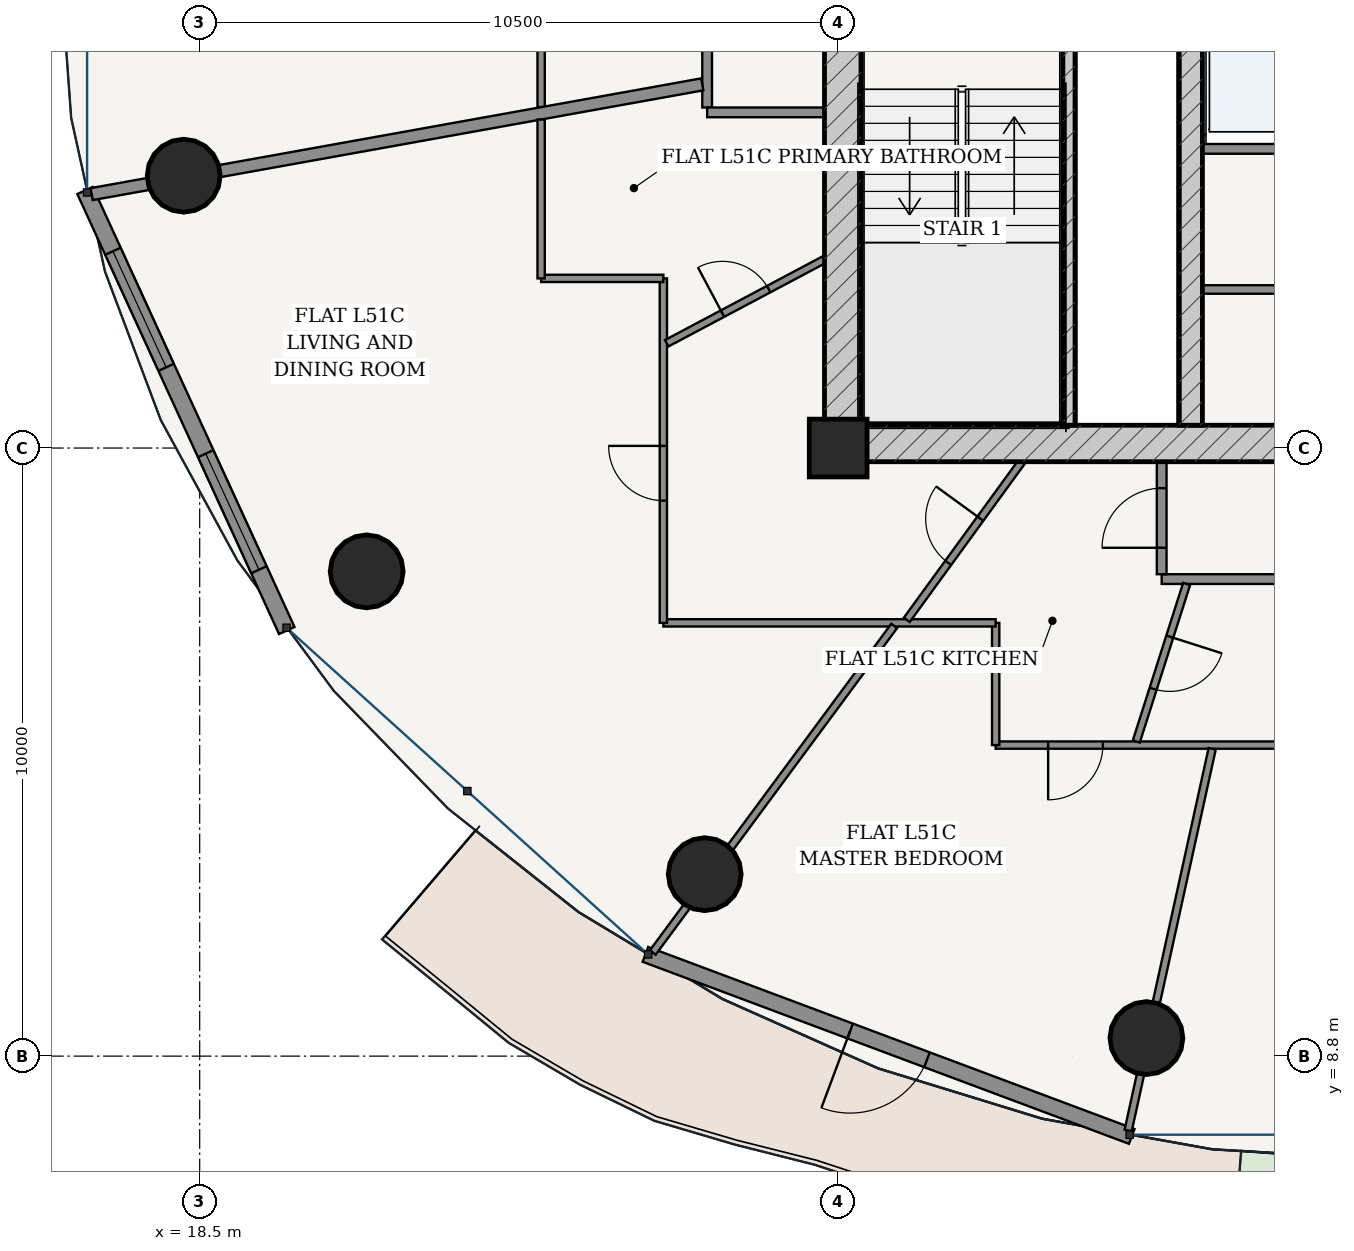
"""IFC4 building model, lengths in metres.
Left out: names, types, materials, properties, quantities, classifications, styles, units other than length and angle.
Written with IfcOpenShell. Run it as: python <this file> out.ifc"""

import sys

from ifc_helpers import new_model, si_unit, direction, frame, frame_2d, origin, origin_2d, place, context, subcontext, project, spatial, rectangle, hollow_circle, extrude, source, transform, mapped, element, fill, save


model = new_model("IFC4")
c1 = context("Model", 3, precision=1e-05, world=origin(), true_north=direction((-0.2419218956, 0.970295726276)))
c2 = subcontext(c1, "Body", "Model", "MODEL_VIEW")
j1 = project(units=[si_unit("LENGTHUNIT", "METRE"), si_unit("PLANEANGLEUNIT", "RADIAN")], contexts=[c1])
p1 = place(None, origin())
s1 = spatial("IfcSite", under=j1, at=p1, CompositionType="ELEMENT")
p2 = place(p1, origin())
s2 = spatial("IfcBuilding", under=s1, at=p2, CompositionType="ELEMENT")
p3 = place(p2, frame((0.0, 0.0, 194.9)))
s3 = spatial("IfcBuildingStorey", under=s2, at=p3, CompositionType="ELEMENT", Elevation=194.9)
p4 = place(p3, frame((29.0, 18.8, 0.0), z_axis=(0.0, 0.0, 1.0), x_axis=(1.0, 0.0, 0.0)))
e1 = element("IfcColumn", 1, at=p4, inside=s3, PredefinedType="COLUMN", context=c2, shape_type="SweptSolid", body=[
    extrude(rectangle(XDim=0.95, YDim=0.95, at=origin_2d()), origin(), (0.0, 0.0, 1.0), 3.7),
])
p5 = place(p3, frame((28.775, 18.875, 0.0), z_axis=(0.0, 0.0, 1.0), x_axis=(1.0, 0.0, 0.0)))
e2 = element("IfcWall", 2, at=p5, inside=s3, PredefinedType="SHEAR", context=c2, shape_type="SweptSolid", body=[
    extrude(rectangle(XDim=18.45, YDim=0.6, at=frame_2d((9.225, 0.0))), origin(), (0.0, 0.0, 1.0), 3.435),
])
p6 = place(p5, frame((8.8, 0.0, 0.0)))
e3 = element("IfcOpeningElement", 3, at=p6, cuts=e2, PredefinedType="OPENING", context=c2, shape_type="SweptSolid", body=[
    extrude(rectangle(XDim=0.85, YDim=2.1, at=frame_2d((0.425, 1.05))), frame((0.0, 0.31, 0.0), z_axis=(0.0, -1.0, 0.0), x_axis=(1.0, 0.0, 0.0)), (0.0, 0.0, 1.0), 0.62),
])
p7 = place(p3, frame((29.075, 19.175, 0.0), z_axis=(0.0, 0.0, 1.0), x_axis=(0.0, 1.0, 0.0)))
e4 = element("IfcWall", 4, at=p7, inside=s3, PredefinedType="SHEAR", context=c2, shape_type="SweptSolid", body=[
    extrude(rectangle(XDim=15.25, YDim=0.6, at=frame_2d((7.625, 0.0))), origin(), (0.0, 0.0, 1.0), 3.435),
])
p8 = place(p7, frame((9.875, 0.0, 0.0)))
e5 = element("IfcOpeningElement", 5, at=p8, cuts=e4, PredefinedType="OPENING", context=c2, shape_type="SweptSolid", body=[
    extrude(rectangle(XDim=1.5, YDim=2.2, at=frame_2d((0.75, 1.1))), frame((0.0, 0.31, 0.0), z_axis=(0.0, -1.0, 0.0), x_axis=(1.0, 0.0, 0.0)), (0.0, 0.0, 1.0), 0.62),
])
p9 = place(p3, frame((32.795, 19.175, 0.0), z_axis=(0.0, 0.0, 1.0), x_axis=(0.0, 1.0, 0.0)))
e6 = element("IfcWall", 6, at=p9, inside=s3, PredefinedType="SOLIDWALL", context=c2, shape_type="SweptSolid", body=[
    extrude(rectangle(XDim=7.375, YDim=0.2, at=frame_2d((3.688, 0.0))), origin(), (0.0, 0.0, 1.0), 3.435),
])
p10 = place(p3, frame((34.8, 19.175, 0.0), z_axis=(0.0, 0.0, 1.0), x_axis=(0.0, 1.0, 0.0)))
e7 = element("IfcWall", 7, at=p10, inside=s3, PredefinedType="SHEAR", context=c2, shape_type="SweptSolid", body=[
    extrude(rectangle(XDim=15.25, YDim=0.38, at=frame_2d((7.625, 0.0))), origin(), (0.0, 0.0, 1.0), 3.435),
])
p11 = place(p10, frame((7.8, 0.0, 0.0)))
e8 = element("IfcOpeningElement", 8, at=p11, cuts=e7, PredefinedType="OPENING", context=c2, shape_type="SweptSolid", body=[
    extrude(rectangle(XDim=1.05, YDim=2.15, at=frame_2d((0.525, 1.075))), frame((0.0, 0.2, 0.0), z_axis=(0.0, -1.0, 0.0), x_axis=(1.0, 0.0, 0.0)), (0.0, 0.0, 1.0), 0.4),
])
for number, where, z_axis, x_axis in (
    (9, (18.237, 23.279, 0.0), (0.0, 0.0, 1.0), (1.0, 0.0, 0.0)),
    (10, (21.246, 16.772, 0.0), (0.0, 0.0, 1.0), (1.0, 0.0, 0.0)),
    (11, (26.805, 11.792, 0.0), (0.0, 0.0, 1.0), (1.0, 0.0, 0.0)),
    (12, (34.069, 9.097, 0.0), (0.0, 0.0, 1.0), (1.0, 0.0, 0.0)),
):
    element("IfcColumn", number, at=place(p3, frame(where, z_axis=z_axis, x_axis=x_axis)), inside=s3, PredefinedType="COLUMN", context=c2, shape_type="SweptSolid", body=[
        extrude(hollow_circle(Radius=0.6, WallThickness=0.038, at=origin_2d()), origin(), (0.0, 0.0, 1.0), 3.7),
    ])
p12 = place(p3, frame((16.615, 23.035, 0.0), z_axis=(0.0, 0.0, 1.0), x_axis=(0.416717018135, -0.909036262641, 0.0)))
e13 = element("IfcWall", 13, at=p12, inside=s3, PredefinedType="SOLIDWALL", context=c2, shape_type="SweptSolid", body=[
    extrude(rectangle(XDim=7.96, YDim=0.28, at=frame_2d((3.98, 0.0))), origin(), (0.0, 0.0, 1.0), 3.435),
])
p13 = place(p12, frame((1.099, 0.0, 0.85)))
e14 = element("IfcOpeningElement", 14, at=p13, cuts=e13, PredefinedType="OPENING", context=c2, shape_type="SweptSolid", body=[
    extrude(rectangle(XDim=2.1, YDim=1.95, at=frame_2d((1.05, 0.975))), frame((0.0, 0.15, 0.0), z_axis=(0.0, -1.0, 0.0), x_axis=(1.0, 0.0, 0.0)), (0.0, 0.0, 1.0), 0.3),
])
p14 = place(p12, frame((4.761, 0.0, 0.85)))
e15 = element("IfcOpeningElement", 15, at=p14, cuts=e13, PredefinedType="OPENING", context=c2, shape_type="SweptSolid", body=[
    extrude(rectangle(XDim=2.1, YDim=1.95, at=frame_2d((1.05, 0.975))), frame((0.0, 0.15, 0.0), z_axis=(0.0, -1.0, 0.0), x_axis=(1.0, 0.0, 0.0)), (0.0, 0.0, 1.0), 0.3),
])
p15 = place(p3, frame((25.83, 10.473, 0.0), z_axis=(0.0, 0.0, 1.0), x_axis=(0.936556918375, -0.350515532672, 0.0)))
e16 = element("IfcWall", 16, at=p15, inside=s3, PredefinedType="SOLIDWALL", context=c2, shape_type="SweptSolid", body=[
    extrude(rectangle(XDim=8.539, YDim=0.26, at=frame_2d((4.27, 0.0))), origin(), (0.0, 0.0, 1.0), 3.435),
])
p16 = place(p15, frame((3.594, 0.0, 0.0)))
e17 = element("IfcOpeningElement", 17, at=p16, cuts=e16, PredefinedType="OPENING", context=c2, shape_type="SweptSolid", body=[
    extrude(rectangle(XDim=1.35, YDim=2.2, at=frame_2d((0.675, 1.1))), frame((0.0, 0.14, 0.0), z_axis=(0.0, -1.0, 0.0), x_axis=(1.0, 0.0, 0.0)), (0.0, 0.0, 1.0), 0.28),
])
p17 = place(p3, frame((34.99, 23.72, 0.0), z_axis=(0.0, 0.0, 1.0), x_axis=(1.0, 0.0, 0.0)))
e18 = element("IfcWall", 18, at=p17, inside=s3, PredefinedType="PARTITIONING", context=c2, shape_type="SweptSolid", body=[
    extrude(rectangle(XDim=6.02, YDim=0.16, at=frame_2d((3.01, 0.0))), origin(), (0.0, 0.0, 1.0), 3.435),
])
p18 = place(p3, frame((34.99, 21.407, 0.0), z_axis=(0.0, 0.0, 1.0), x_axis=(1.0, 0.0, 0.0)))
e19 = element("IfcWall", 19, at=p18, inside=s3, PredefinedType="PARTITIONING", context=c2, shape_type="SweptSolid", body=[
    extrude(rectangle(XDim=6.02, YDim=0.14, at=frame_2d((3.01, 0.0))), origin(), (0.0, 0.0, 1.0), 3.435),
])
p19 = place(p18, frame((2.585, 0.0, 0.0)))
e20 = element("IfcOpeningElement", 20, at=p19, cuts=e19, PredefinedType="OPENING", context=c2, shape_type="SweptSolid", body=[
    extrude(rectangle(XDim=0.85, YDim=2.1, at=frame_2d((0.425, 1.05))), frame((0.0, 0.08, 0.0), z_axis=(0.0, -1.0, 0.0), x_axis=(1.0, 0.0, 0.0)), (0.0, 0.0, 1.0), 0.16),
])
p20 = place(p3, frame((26.845, 24.4, 0.0), z_axis=(0.0, 0.0, 1.0), x_axis=(0.0, 1.0, 0.0)))
e21 = element("IfcWall", 21, at=p20, inside=s3, PredefinedType="PARTITIONING", context=c2, shape_type="SweptSolid", body=[
    extrude(rectangle(XDim=10.625, YDim=0.16, at=frame_2d((5.312, 0.0))), origin(), (0.0, 0.0, 1.0), 2.951),
])
p21 = place(p3, frame((26.845, 24.32, 0.0), z_axis=(0.0, 0.0, 1.0), x_axis=(1.0, 0.0, 0.0)))
e22 = element("IfcWall", 22, at=p21, inside=s3, PredefinedType="PARTITIONING", context=c2, shape_type="SweptSolid", body=[
    extrude(rectangle(XDim=1.93, YDim=0.16, at=frame_2d((0.965, 0.0))), origin(), (0.0, 0.0, 1.0), 3.435),
])
p22 = place(p3, frame((34.32, 16.645, 0.0), z_axis=(0.0, 0.0, 1.0), x_axis=(1.0, 0.0, 0.0)))
e23 = element("IfcWall", 23, at=p22, inside=s3, PredefinedType="PARTITIONING", context=c2, shape_type="SweptSolid", body=[
    extrude(rectangle(XDim=14.835, YDim=0.16, at=frame_2d((7.417, 0.0))), origin(), (0.0, 0.0, 1.0), 2.951),
])
p23 = place(p22, frame((11.961, 0.0, 0.0)))
e24 = element("IfcOpeningElement", 24, at=p23, cuts=e23, PredefinedType="OPENING", context=c2, shape_type="SweptSolid", body=[
    extrude(rectangle(XDim=0.98, YDim=2.2, at=frame_2d((0.49, 1.1))), frame((0.0, 0.09, 0.0), z_axis=(0.0, -1.0, 0.0), x_axis=(1.0, 0.0, 0.0)), (0.0, 0.0, 1.0), 0.18),
])
p24 = place(p3, frame((34.32, 16.725, 0.0), z_axis=(0.0, 0.0, 1.0), x_axis=(0.0, 1.0, 0.0)))
e25 = element("IfcWall", 25, at=p24, inside=s3, PredefinedType="PARTITIONING", context=c2, shape_type="SweptSolid", body=[
    extrude(rectangle(XDim=1.85, YDim=0.16, at=frame_2d((0.925, 0.0))), origin(), (0.0, 0.0, 1.0), 3.435),
])
p25 = place(p24, frame((0.435, 0.0, 0.0)))
e26 = element("IfcOpeningElement", 26, at=p25, cuts=e25, PredefinedType="OPENING", context=c2, shape_type="SweptSolid", body=[
    extrude(rectangle(XDim=0.98, YDim=2.2, at=frame_2d((0.49, 1.1))), frame((0.0, 0.09, 0.0), z_axis=(0.0, -1.0, 0.0), x_axis=(1.0, 0.0, 0.0)), (0.0, 0.0, 1.0), 0.18),
])
p26 = place(p3, frame((24.115, 24.406, 0.0), z_axis=(0.0, 0.0, 1.0), x_axis=(0.0, 1.0, 0.0)))
e27 = element("IfcWall", 27, at=p26, inside=s3, PredefinedType="PARTITIONING", context=c2, shape_type="SweptSolid", body=[
    extrude(rectangle(XDim=13.429, YDim=0.12, at=frame_2d((6.714, 0.0))), origin(), (0.0, 0.0, 1.0), 2.951),
])
p27 = place(p26, frame((9.641, 0.0, 0.0)))
e28 = element("IfcOpeningElement", 28, at=p27, cuts=e27, PredefinedType="OPENING", context=c2, shape_type="SweptSolid", body=[
    extrude(rectangle(XDim=0.9, YDim=2.15, at=frame_2d((0.45, 1.075))), frame((0.0, 0.07, 0.0), z_axis=(0.0, -1.0, 0.0), x_axis=(1.0, 0.0, 0.0)), (0.0, 0.0, 1.0), 0.14),
])
p28 = place(p3, frame((26.765, 24.781, 0.0), z_axis=(0.0, 0.0, 1.0), x_axis=(-0.984226684914, -0.176911934879, 0.0)))
e29 = element("IfcWall", 29, at=p28, inside=s3, PredefinedType="PARTITIONING", context=c2, shape_type="SweptSolid", body=[
    extrude(rectangle(XDim=10.202, YDim=0.2, at=frame_2d((5.101, 0.0))), origin(), (0.0, 0.0, 1.0), 2.951),
])
p29 = place(p3, frame((40.734, 13.915, 0.0), z_axis=(0.0, 0.0, 1.0), x_axis=(-1.0, 0.0, 0.0)))
e30 = element("IfcWall", 30, at=p29, inside=s3, PredefinedType="PARTITIONING", context=c2, shape_type="SweptSolid", body=[
    extrude(rectangle(XDim=9.144, YDim=0.12, at=frame_2d((4.572, 0.0))), origin(), (0.0, 0.0, 1.0), 2.951),
])
p30 = place(p29, frame((7.381, 0.0, 0.0)))
e31 = element("IfcOpeningElement", 31, at=p30, cuts=e30, PredefinedType="OPENING", context=c2, shape_type="SweptSolid", body=[
    extrude(rectangle(XDim=0.9, YDim=2.15, at=frame_2d((0.45, 1.075))), frame((0.0, 0.07, 0.0), z_axis=(0.0, -1.0, 0.0), x_axis=(1.0, 0.0, 0.0)), (0.0, 0.0, 1.0), 0.14),
])
p31 = place(p29, frame((2.458, 0.0, 0.0)))
e32 = element("IfcOpeningElement", 32, at=p31, cuts=e30, PredefinedType="OPENING", context=c2, shape_type="SweptSolid", body=[
    extrude(rectangle(XDim=0.9, YDim=2.15, at=frame_2d((0.45, 1.075))), frame((0.0, 0.07, 0.0), z_axis=(0.0, -1.0, 0.0), x_axis=(1.0, 0.0, 0.0)), (0.0, 0.0, 1.0), 0.14),
])
p32 = place(p3, frame((31.59, 13.915, 0.0), z_axis=(0.0, 0.0, 1.0), x_axis=(0.0, 1.0, 0.0)))
e33 = element("IfcWall", 33, at=p32, inside=s3, PredefinedType="PARTITIONING", context=c2, shape_type="SweptSolid", body=[
    extrude(rectangle(XDim=2.01, YDim=0.12, at=frame_2d((1.005, 0.0))), origin(), (0.0, 0.0, 1.0), 3.11),
])
p33 = place(p3, frame((31.59, 15.925, 0.0), z_axis=(0.0, 0.0, 1.0), x_axis=(-1.0, 0.0, 0.0)))
e34 = element("IfcWall", 34, at=p33, inside=s3, PredefinedType="PARTITIONING", context=c2, shape_type="SweptSolid", body=[
    extrude(rectangle(XDim=5.465, YDim=0.12, at=frame_2d((2.732, 0.0))), origin(), (0.0, 0.0, 1.0), 2.951),
])
p34 = place(p3, frame((26.125, 15.925, 0.0), z_axis=(0.0, 0.0, 1.0), x_axis=(0.0, 1.0, 0.0)))
e35 = element("IfcWall", 35, at=p34, inside=s3, PredefinedType="PARTITIONING", context=c2, shape_type="SweptSolid", body=[
    extrude(rectangle(XDim=5.665, YDim=0.12, at=frame_2d((2.833, 0.0))), origin(), (0.0, 0.0, 1.0), 2.951),
])
p35 = place(p34, frame((2.01, 0.0, 0.0)))
e36 = element("IfcOpeningElement", 36, at=p35, cuts=e35, PredefinedType="OPENING", context=c2, shape_type="SweptSolid", body=[
    extrude(rectangle(XDim=0.9, YDim=2.15, at=frame_2d((0.45, 1.075))), frame((0.0, 0.07, 0.0), z_axis=(0.0, -1.0, 0.0), x_axis=(1.0, 0.0, 0.0)), (0.0, 0.0, 1.0), 0.14),
])
p36 = place(p3, frame((26.125, 21.59, 0.0), z_axis=(0.0, 0.0, 1.0), x_axis=(-1.0, 0.0, 0.0)))
e37 = element("IfcWall", 37, at=p36, inside=s3, PredefinedType="PARTITIONING", context=c2, shape_type="SweptSolid", body=[
    extrude(rectangle(XDim=2.01, YDim=0.12, at=frame_2d((1.005, 0.0))), origin(), (0.0, 0.0, 1.0), 3.11),
])
p37 = place(p3, frame((24.115, 21.59, 0.0), z_axis=(0.0, 0.0, 1.0), x_axis=(0.0, 1.0, 0.0)))
e38 = element("IfcWall", 38, at=p37, inside=s3, PredefinedType="PARTITIONING", context=c2, shape_type="SweptSolid", body=[
    extrude(rectangle(XDim=2.612, YDim=0.12, at=frame_2d((1.306, 0.0))), origin(), (0.0, 0.0, 1.0), 3.11),
])
p38 = place(p3, frame((29.922, 15.875, 0.0), z_axis=(0.0, 0.0, 1.0), x_axis=(-0.594524636617, -0.804077394568, 0.0)))
e39 = element("IfcWall", 39, at=p38, inside=s3, PredefinedType="PARTITIONING", context=c2, shape_type="SweptSolid", body=[
    extrude(rectangle(XDim=6.68, YDim=0.12, at=frame_2d((3.34, 0.0))), origin(), (0.0, 0.0, 1.0), 2.951),
])
p39 = place(p3, frame((35.15, 13.854, 0.0), z_axis=(0.0, 0.0, 1.0), x_axis=(-0.214942949264, -0.976626606519, 0.0)))
e40 = element("IfcWall", 40, at=p39, inside=s3, PredefinedType="PARTITIONING", context=c2, shape_type="SweptSolid", body=[
    extrude(rectangle(XDim=6.427, YDim=0.12, at=frame_2d((3.213, 0.0))), origin(), (0.0, 0.0, 1.0), 2.951),
])
p40 = place(p3, frame((28.775, 21.901, 0.0), z_axis=(0.0, 0.0, 1.0), x_axis=(-0.883156592468, -0.46907828044, 0.0)))
e41 = element("IfcWall", 41, at=p40, inside=s3, PredefinedType="PARTITIONING", context=c2, shape_type="SweptSolid", body=[
    extrude(rectangle(XDim=2.938, YDim=0.12, at=frame_2d((1.469, 0.0))), origin(), (0.0, 0.0, 1.0), 3.435),
])
p41 = place(p40, frame((1.039, 0.0, 0.0)))
e42 = element("IfcOpeningElement", 42, at=p41, cuts=e41, PredefinedType="OPENING", context=c2, shape_type="SweptSolid", body=[
    extrude(rectangle(XDim=0.86, YDim=2.15, at=frame_2d((0.43, 1.075))), frame((0.0, 0.07, 0.0), z_axis=(0.0, -1.0, 0.0), x_axis=(1.0, 0.0, 0.0)), (0.0, 0.0, 1.0), 0.14),
])
p42 = place(p3, frame((32.019, 18.575, 0.0), z_axis=(0.0, 0.0, 1.0), x_axis=(-0.588135570825, -0.808762357143, 0.0)))
e43 = element("IfcWall", 43, at=p42, inside=s3, PredefinedType="PARTITIONING", context=c2, shape_type="SweptSolid", body=[
    extrude(rectangle(XDim=3.215, YDim=0.12, at=frame_2d((1.607, 0.0))), origin(), (0.0, 0.0, 1.0), 3.435),
])
p43 = place(p42, frame((1.157, 0.0, 0.0)))
e44 = element("IfcOpeningElement", 44, at=p43, cuts=e43, PredefinedType="OPENING", context=c2, shape_type="SweptSolid", body=[
    extrude(rectangle(XDim=0.9, YDim=2.15, at=frame_2d((0.45, 1.075))), frame((0.0, 0.07, 0.0), z_axis=(0.0, -1.0, 0.0), x_axis=(1.0, 0.0, 0.0)), (0.0, 0.0, 1.0), 0.14),
])
p44 = place(p3, frame((34.73, 16.565, 0.0), z_axis=(0.0, 0.0, 1.0), x_axis=(-0.304300161081, -0.952576197459, 0.0)))
e45 = element("IfcWall", 45, at=p44, inside=s3, PredefinedType="PARTITIONING", context=c2, shape_type="SweptSolid", body=[
    extrude(rectangle(XDim=2.72, YDim=0.12, at=frame_2d((1.36, 0.0))), origin(), (0.0, 0.0, 1.0), 3.11),
])
p45 = place(p44, frame((0.91, 0.0, 0.0)))
e46 = element("IfcOpeningElement", 46, at=p45, cuts=e45, PredefinedType="OPENING", context=c2, shape_type="SweptSolid", body=[
    extrude(rectangle(XDim=0.9, YDim=2.15, at=frame_2d((0.45, 1.075))), frame((0.0, 0.07, 0.0), z_axis=(0.0, -1.0, 0.0), x_axis=(1.0, 0.0, 0.0)), (0.0, 0.0, 1.0), 0.14),
])
m1 = source(origin(), c2, "Body", "SweptSolid", [
    extrude(rectangle(XDim=2.1, YDim=1.95, at=frame_2d((1.05, 0.975))), frame((0.0, 0.03, 0.0), z_axis=(0.0, -1.0, 0.0), x_axis=(1.0, 0.0, 0.0)), (0.0, 0.0, 1.0), 0.06),
])
p46 = place(p13, origin())
e47 = element("IfcWindow", 47, at=p46, inside=s3, PartitioningType="SINGLE_PANEL", PredefinedType="WINDOW", context=c2, shape_type="MappedRepresentation", body=[
    mapped(m1, transform((0.0, 0.0, 0.0), scale=1.0)),
])
fill(e14, e47)
p47 = place(p14, origin())
e48 = element("IfcWindow", 48, at=p47, inside=s3, PartitioningType="SINGLE_PANEL", PredefinedType="WINDOW", context=c2, shape_type="MappedRepresentation", body=[
    mapped(m1, transform((0.0, 0.0, 0.0), scale=1.0)),
])
fill(e15, e48)
m2 = source(origin(), c2, "Body", "SweptSolid", [
    extrude(rectangle(XDim=1.35, YDim=2.2, at=frame_2d((0.675, 1.1))), frame((0.0, 0.025, 0.0), z_axis=(0.0, -1.0, 0.0), x_axis=(1.0, 0.0, 0.0)), (0.0, 0.0, 1.0), 0.05),
])
p48 = place(p16, frame((1.35, 0.0, 0.0), z_axis=(0.0, 0.0, 1.0), x_axis=(-1.0, 0.0, 0.0)))
e49 = element("IfcDoor", 49, at=p48, inside=s3, OperationType="SINGLE_SWING_RIGHT", PredefinedType="DOOR", context=c2, shape_type="MappedRepresentation", body=[
    mapped(m2, transform((0.0, 0.0, 0.0), scale=1.0)),
])
fill(e17, e49)
m3 = source(origin(), c2, "Body", "SweptSolid", [
    extrude(rectangle(XDim=0.98, YDim=2.2, at=frame_2d((0.49, 1.1))), frame((0.0, 0.025, 0.0), z_axis=(0.0, -1.0, 0.0), x_axis=(1.0, 0.0, 0.0)), (0.0, 0.0, 1.0), 0.05),
])
p49 = place(p25, origin())
e50 = element("IfcDoor", 50, at=p49, inside=s3, OperationType="SINGLE_SWING_LEFT", PredefinedType="DOOR", context=c2, shape_type="MappedRepresentation", body=[
    mapped(m3, transform((0.0, 0.0, 0.0), scale=1.0)),
])
fill(e26, e50)
m4 = source(origin(), c2, "Body", "SweptSolid", [
    extrude(rectangle(XDim=0.9, YDim=2.15, at=frame_2d((0.45, 1.075))), frame((0.0, 0.025, 0.0), z_axis=(0.0, -1.0, 0.0), x_axis=(1.0, 0.0, 0.0)), (0.0, 0.0, 1.0), 0.05),
])
p50 = place(p43, frame((0.9, 0.0, 0.0), z_axis=(0.0, 0.0, 1.0), x_axis=(-1.0, 0.0, 0.0)))
e51 = element("IfcDoor", 51, at=p50, inside=s3, OperationType="SINGLE_SWING_RIGHT", PredefinedType="DOOR", context=c2, shape_type="MappedRepresentation", body=[
    mapped(m4, transform((0.0, 0.0, 0.0), scale=1.0)),
])
fill(e44, e51)
p51 = place(p45, origin())
e52 = element("IfcDoor", 52, at=p51, inside=s3, OperationType="SINGLE_SWING_LEFT", PredefinedType="DOOR", context=c2, shape_type="MappedRepresentation", body=[
    mapped(m4, transform((0.0, 0.0, 0.0), scale=1.0)),
])
fill(e46, e52)
p52 = place(p30, origin())
e53 = element("IfcDoor", 53, at=p52, inside=s3, OperationType="SINGLE_SWING_RIGHT", PredefinedType="DOOR", context=c2, shape_type="MappedRepresentation", body=[
    mapped(m4, transform((0.0, 0.0, 0.0), scale=1.0)),
])
fill(e31, e53)
m5 = source(origin(), c2, "Body", "SweptSolid", [
    extrude(rectangle(XDim=0.86, YDim=2.15, at=frame_2d((0.43, 1.075))), frame((0.0, 0.025, 0.0), z_axis=(0.0, -1.0, 0.0), x_axis=(1.0, 0.0, 0.0)), (0.0, 0.0, 1.0), 0.05),
])
p53 = place(p41, frame((0.86, 0.0, 0.0), z_axis=(0.0, 0.0, 1.0), x_axis=(-1.0, 0.0, 0.0)))
e54 = element("IfcDoor", 54, at=p53, inside=s3, OperationType="SINGLE_SWING_LEFT", PredefinedType="DOOR", context=c2, shape_type="MappedRepresentation", body=[
    mapped(m5, transform((0.0, 0.0, 0.0), scale=1.0)),
])
fill(e42, e54)
p54 = place(p35, origin())
e55 = element("IfcDoor", 55, at=p54, inside=s3, OperationType="SINGLE_SWING_RIGHT", PredefinedType="DOOR", context=c2, shape_type="MappedRepresentation", body=[
    mapped(m4, transform((0.0, 0.0, 0.0), scale=1.0)),
])
fill(e36, e55)
save(model, sys.argv[1])
